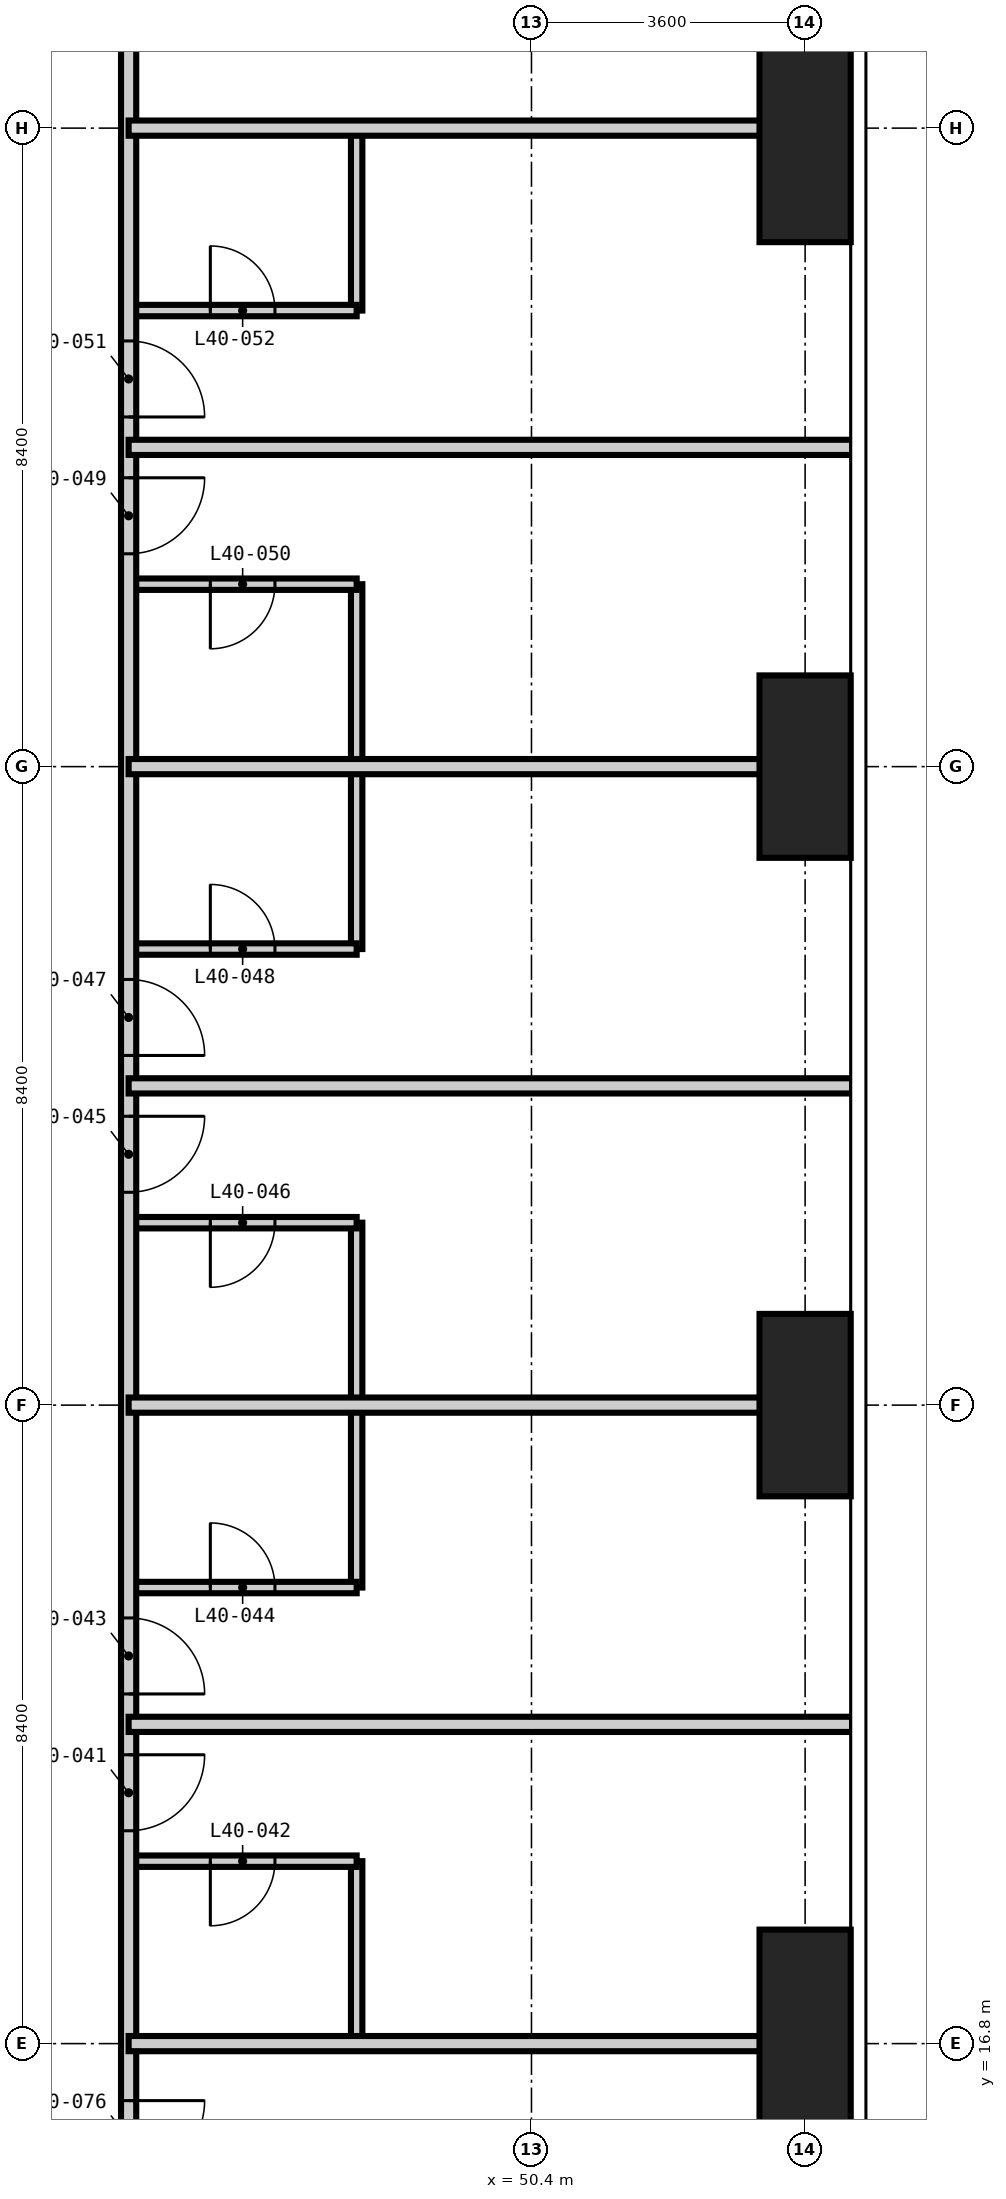
"""IFC4 building model, lengths in metres.
Left out: names, types, materials, properties, quantities, classifications, styles, units other than length and angle.
Written with IfcOpenShell. Run it as: python <this file> out.ifc"""

import sys

from ifc_helpers import new_model, si_unit, direction, frame, frame_2d, origin, origin_2d, place, context, subcontext, project, spatial, rectangle, extrude, element, fill, save


model = new_model("IFC4")
c1 = context("Model", 3, precision=1e-05, world=origin(), true_north=direction((0.0, 1.0)))
c2 = subcontext(c1, "Body", "Model", "MODEL_VIEW")
j1 = project(units=[si_unit("LENGTHUNIT", "METRE"), si_unit("PLANEANGLEUNIT", "RADIAN")], contexts=[c1])
p1 = place(None, origin())
s1 = spatial("IfcSite", under=j1, at=p1, CompositionType="ELEMENT")
p2 = place(p1, origin())
s2 = spatial("IfcBuilding", under=s1, at=p2, CompositionType="ELEMENT")
p3 = place(p2, frame((0.0, 0.0, 159.0)))
s3 = spatial("IfcBuildingStorey", under=s2, at=p3, CompositionType="ELEMENT", Elevation=159.0)
p4 = place(p3, frame((54.0, 16.8, -0.35), z_axis=(0.0, 0.0, 1.0), x_axis=(1.0, 0.0, 0.0)))
e1 = element("IfcColumn", 1, at=p4, inside=s3, PredefinedType="COLUMN", context=c2, shape_type="SweptSolid", body=[
    extrude(rectangle(XDim=1.2, YDim=3.0, at=origin_2d()), origin(), (0.0, 0.0, 1.0), 3.6),
])
for number, where, z_axis, x_axis in (
    (2, (54.0, 25.2, -0.35), (0.0, 0.0, 1.0), (1.0, 0.0, 0.0)),
    (3, (54.0, 33.6, -0.35), (0.0, 0.0, 1.0), (1.0, 0.0, 0.0)),
):
    element("IfcColumn", number, at=place(p3, frame(where, z_axis=z_axis, x_axis=x_axis)), inside=s3, PredefinedType="COLUMN", context=c2, shape_type="SweptSolid", body=[
        extrude(rectangle(XDim=1.2, YDim=2.4, at=origin_2d()), origin(), (0.0, 0.0, 1.0), 3.6),
    ])
p5 = place(p3, frame((54.0, 42.0, -0.35), z_axis=(0.0, 0.0, 1.0), x_axis=(1.0, 0.0, 0.0)))
e4 = element("IfcColumn", 4, at=p5, inside=s3, PredefinedType="COLUMN", context=c2, shape_type="SweptSolid", body=[
    extrude(rectangle(XDim=1.2, YDim=3.0, at=origin_2d()), origin(), (0.0, 0.0, 1.0), 3.6),
])
p6 = place(p3, frame((48.1, 16.8, 0.0), z_axis=(0.0, 0.0, 1.0), x_axis=(0.0, 1.0, 0.0)))
e5 = element("IfcWall", 5, at=p6, inside=s3, PredefinedType="PARTITIONING", context=c2, shape_type="SweptSolid", body=[
    extrude(rectangle(XDim=2.4, YDim=0.15, at=frame_2d((1.2, 0.0))), origin(), (0.0, 0.0, 1.0), 3.25),
])
for number, where, z_axis, x_axis in (
    (6, (48.1, 22.8, 0.0), (0.0, 0.0, 1.0), (0.0, 1.0, 0.0)),
    (7, (48.1, 31.2, 0.0), (0.0, 0.0, 1.0), (0.0, 1.0, 0.0)),
):
    element("IfcWall", number, at=place(p3, frame(where, z_axis=z_axis, x_axis=x_axis)), inside=s3, PredefinedType="PARTITIONING", context=c2, shape_type="SweptSolid", body=[
        extrude(rectangle(XDim=4.8, YDim=0.15, at=frame_2d((2.4, 0.0))), origin(), (0.0, 0.0, 1.0), 3.25),
    ])
p7 = place(p3, frame((48.1, 39.6, 0.0), z_axis=(0.0, 0.0, 1.0), x_axis=(0.0, 1.0, 0.0)))
e8 = element("IfcWall", 8, at=p7, inside=s3, PredefinedType="PARTITIONING", context=c2, shape_type="SweptSolid", body=[
    extrude(rectangle(XDim=2.4, YDim=0.15, at=frame_2d((1.2, 0.0))), origin(), (0.0, 0.0, 1.0), 3.25),
])
p8 = place(p3, frame((45.1, 19.2, 0.0), z_axis=(0.0, 0.0, 1.0), x_axis=(1.0, 0.0, 0.0)))
e9 = element("IfcWall", 9, at=p8, inside=s3, PredefinedType="PARTITIONING", context=c2, shape_type="SweptSolid", body=[
    extrude(rectangle(XDim=3.0, YDim=0.15, at=frame_2d((1.5, 0.0))), origin(), (0.0, 0.0, 1.0), 3.25),
])
p9 = place(p8, frame((1.075, 0.0, 0.0)))
e10 = element("IfcOpeningElement", 10, at=p9, cuts=e9, PredefinedType="OPENING", context=c2, shape_type="SweptSolid", body=[
    extrude(rectangle(XDim=0.85, YDim=2.1, at=frame_2d((0.425, 1.05))), frame((0.0, 0.085, 0.0), z_axis=(0.0, -1.0, 0.0), x_axis=(1.0, 0.0, 0.0)), (0.0, 0.0, 1.0), 0.17),
])
p10 = place(p3, frame((45.1, 22.8, 0.0), z_axis=(0.0, 0.0, 1.0), x_axis=(1.0, 0.0, 0.0)))
e11 = element("IfcWall", 11, at=p10, inside=s3, PredefinedType="PARTITIONING", context=c2, shape_type="SweptSolid", body=[
    extrude(rectangle(XDim=3.0, YDim=0.15, at=frame_2d((1.5, 0.0))), origin(), (0.0, 0.0, 1.0), 3.25),
])
p11 = place(p10, frame((1.075, 0.0, 0.0)))
e12 = element("IfcOpeningElement", 12, at=p11, cuts=e11, PredefinedType="OPENING", context=c2, shape_type="SweptSolid", body=[
    extrude(rectangle(XDim=0.85, YDim=2.1, at=frame_2d((0.425, 1.05))), frame((0.0, 0.085, 0.0), z_axis=(0.0, -1.0, 0.0), x_axis=(1.0, 0.0, 0.0)), (0.0, 0.0, 1.0), 0.17),
])
p12 = place(p3, frame((45.1, 27.6, 0.0), z_axis=(0.0, 0.0, 1.0), x_axis=(1.0, 0.0, 0.0)))
e13 = element("IfcWall", 13, at=p12, inside=s3, PredefinedType="PARTITIONING", context=c2, shape_type="SweptSolid", body=[
    extrude(rectangle(XDim=3.0, YDim=0.15, at=frame_2d((1.5, 0.0))), origin(), (0.0, 0.0, 1.0), 3.25),
])
p13 = place(p12, frame((1.075, 0.0, 0.0)))
e14 = element("IfcOpeningElement", 14, at=p13, cuts=e13, PredefinedType="OPENING", context=c2, shape_type="SweptSolid", body=[
    extrude(rectangle(XDim=0.85, YDim=2.1, at=frame_2d((0.425, 1.05))), frame((0.0, 0.085, 0.0), z_axis=(0.0, -1.0, 0.0), x_axis=(1.0, 0.0, 0.0)), (0.0, 0.0, 1.0), 0.17),
])
p14 = place(p3, frame((45.1, 31.2, 0.0), z_axis=(0.0, 0.0, 1.0), x_axis=(1.0, 0.0, 0.0)))
e15 = element("IfcWall", 15, at=p14, inside=s3, PredefinedType="PARTITIONING", context=c2, shape_type="SweptSolid", body=[
    extrude(rectangle(XDim=3.0, YDim=0.15, at=frame_2d((1.5, 0.0))), origin(), (0.0, 0.0, 1.0), 3.25),
])
p15 = place(p14, frame((1.075, 0.0, 0.0)))
e16 = element("IfcOpeningElement", 16, at=p15, cuts=e15, PredefinedType="OPENING", context=c2, shape_type="SweptSolid", body=[
    extrude(rectangle(XDim=0.85, YDim=2.1, at=frame_2d((0.425, 1.05))), frame((0.0, 0.085, 0.0), z_axis=(0.0, -1.0, 0.0), x_axis=(1.0, 0.0, 0.0)), (0.0, 0.0, 1.0), 0.17),
])
p16 = place(p3, frame((45.1, 36.0, 0.0), z_axis=(0.0, 0.0, 1.0), x_axis=(1.0, 0.0, 0.0)))
e17 = element("IfcWall", 17, at=p16, inside=s3, PredefinedType="PARTITIONING", context=c2, shape_type="SweptSolid", body=[
    extrude(rectangle(XDim=3.0, YDim=0.15, at=frame_2d((1.5, 0.0))), origin(), (0.0, 0.0, 1.0), 3.25),
])
p17 = place(p16, frame((1.075, 0.0, 0.0)))
e18 = element("IfcOpeningElement", 18, at=p17, cuts=e17, PredefinedType="OPENING", context=c2, shape_type="SweptSolid", body=[
    extrude(rectangle(XDim=0.85, YDim=2.1, at=frame_2d((0.425, 1.05))), frame((0.0, 0.085, 0.0), z_axis=(0.0, -1.0, 0.0), x_axis=(1.0, 0.0, 0.0)), (0.0, 0.0, 1.0), 0.17),
])
p18 = place(p3, frame((45.1, 39.6, 0.0), z_axis=(0.0, 0.0, 1.0), x_axis=(1.0, 0.0, 0.0)))
e19 = element("IfcWall", 19, at=p18, inside=s3, PredefinedType="PARTITIONING", context=c2, shape_type="SweptSolid", body=[
    extrude(rectangle(XDim=3.0, YDim=0.15, at=frame_2d((1.5, 0.0))), origin(), (0.0, 0.0, 1.0), 3.25),
])
p19 = place(p18, frame((1.075, 0.0, 0.0)))
e20 = element("IfcOpeningElement", 20, at=p19, cuts=e19, PredefinedType="OPENING", context=c2, shape_type="SweptSolid", body=[
    extrude(rectangle(XDim=0.85, YDim=2.1, at=frame_2d((0.425, 1.05))), frame((0.0, 0.085, 0.0), z_axis=(0.0, -1.0, 0.0), x_axis=(1.0, 0.0, 0.0)), (0.0, 0.0, 1.0), 0.17),
])
p20 = place(p3, frame((45.1, 45.7, 0.0), z_axis=(0.0, 0.0, 1.0), x_axis=(0.0, -1.0, 0.0)))
e21 = element("IfcWall", 21, at=p20, inside=s3, PredefinedType="PARTITIONING", context=c2, shape_type="SweptSolid", body=[
    extrude(rectangle(XDim=31.4, YDim=0.2, at=frame_2d((15.7, 0.0))), origin(), (0.0, 0.0, 1.0), 3.25),
])
p21 = place(p20, frame((25.1, 0.0, 0.0)))
e22 = element("IfcOpeningElement", 22, at=p21, cuts=e21, PredefinedType="OPENING", context=c2, shape_type="SweptSolid", body=[
    extrude(rectangle(XDim=1.0, YDim=2.2, at=frame_2d((0.5, 1.1))), frame((0.0, 0.11, 0.0), z_axis=(0.0, -1.0, 0.0), x_axis=(1.0, 0.0, 0.0)), (0.0, 0.0, 1.0), 0.22),
])
p22 = place(p20, frame((23.3, 0.0, 0.0)))
e23 = element("IfcOpeningElement", 23, at=p22, cuts=e21, PredefinedType="OPENING", context=c2, shape_type="SweptSolid", body=[
    extrude(rectangle(XDim=1.0, YDim=2.2, at=frame_2d((0.5, 1.1))), frame((0.0, 0.11, 0.0), z_axis=(0.0, -1.0, 0.0), x_axis=(1.0, 0.0, 0.0)), (0.0, 0.0, 1.0), 0.22),
])
p23 = place(p20, frame((16.7, 0.0, 0.0)))
e24 = element("IfcOpeningElement", 24, at=p23, cuts=e21, PredefinedType="OPENING", context=c2, shape_type="SweptSolid", body=[
    extrude(rectangle(XDim=1.0, YDim=2.2, at=frame_2d((0.5, 1.1))), frame((0.0, 0.11, 0.0), z_axis=(0.0, -1.0, 0.0), x_axis=(1.0, 0.0, 0.0)), (0.0, 0.0, 1.0), 0.22),
])
p24 = place(p20, frame((14.9, 0.0, 0.0)))
e25 = element("IfcOpeningElement", 25, at=p24, cuts=e21, PredefinedType="OPENING", context=c2, shape_type="SweptSolid", body=[
    extrude(rectangle(XDim=1.0, YDim=2.2, at=frame_2d((0.5, 1.1))), frame((0.0, 0.11, 0.0), z_axis=(0.0, -1.0, 0.0), x_axis=(1.0, 0.0, 0.0)), (0.0, 0.0, 1.0), 0.22),
])
p25 = place(p20, frame((8.3, 0.0, 0.0)))
e26 = element("IfcOpeningElement", 26, at=p25, cuts=e21, PredefinedType="OPENING", context=c2, shape_type="SweptSolid", body=[
    extrude(rectangle(XDim=1.0, YDim=2.2, at=frame_2d((0.5, 1.1))), frame((0.0, 0.11, 0.0), z_axis=(0.0, -1.0, 0.0), x_axis=(1.0, 0.0, 0.0)), (0.0, 0.0, 1.0), 0.22),
])
p26 = place(p20, frame((6.5, 0.0, 0.0)))
e27 = element("IfcOpeningElement", 27, at=p26, cuts=e21, PredefinedType="OPENING", context=c2, shape_type="SweptSolid", body=[
    extrude(rectangle(XDim=1.0, YDim=2.2, at=frame_2d((0.5, 1.1))), frame((0.0, 0.11, 0.0), z_axis=(0.0, -1.0, 0.0), x_axis=(1.0, 0.0, 0.0)), (0.0, 0.0, 1.0), 0.22),
])
p27 = place(p20, frame((29.65, 0.0, 0.0)))
e28 = element("IfcOpeningElement", 28, at=p27, cuts=e21, PredefinedType="OPENING", context=c2, shape_type="SweptSolid", body=[
    extrude(rectangle(XDim=1.0, YDim=2.2, at=frame_2d((0.5, 1.1))), frame((0.0, 0.11, 0.0), z_axis=(0.0, -1.0, 0.0), x_axis=(1.0, 0.0, 0.0)), (0.0, 0.0, 1.0), 0.22),
])
p28 = place(p20, frame((1.35, 0.0, 0.0)))
e29 = element("IfcOpeningElement", 29, at=p28, cuts=e21, PredefinedType="OPENING", context=c2, shape_type="SweptSolid", body=[
    extrude(rectangle(XDim=1.0, YDim=2.2, at=frame_2d((0.5, 1.1))), frame((0.0, 0.11, 0.0), z_axis=(0.0, -1.0, 0.0), x_axis=(1.0, 0.0, 0.0)), (0.0, 0.0, 1.0), 0.22),
])
for number, where, z_axis, x_axis in (
    (30, (45.1, 16.8, 0.0), (0.0, 0.0, 1.0), (1.0, 0.0, 0.0)),
    (31, (45.1, 21.0, 0.0), (0.0, 0.0, 1.0), (1.0, 0.0, 0.0)),
    (32, (45.1, 25.2, 0.0), (0.0, 0.0, 1.0), (1.0, 0.0, 0.0)),
    (33, (45.1, 29.4, 0.0), (0.0, 0.0, 1.0), (1.0, 0.0, 0.0)),
    (34, (45.1, 33.6, 0.0), (0.0, 0.0, 1.0), (1.0, 0.0, 0.0)),
    (35, (45.1, 37.8, 0.0), (0.0, 0.0, 1.0), (1.0, 0.0, 0.0)),
    (36, (45.1, 42.0, 0.0), (0.0, 0.0, 1.0), (1.0, 0.0, 0.0)),
):
    element("IfcWall", number, at=place(p3, frame(where, z_axis=z_axis, x_axis=x_axis)), inside=s3, PredefinedType="PARTITIONING", context=c2, shape_type="SweptSolid", body=[
        extrude(rectangle(XDim=9.518, YDim=0.2, at=frame_2d((4.759, 0.0))), origin(), (0.0, 0.0, 1.0), 3.25),
    ])
p29 = place(p21, origin())
e37 = element("IfcDoor", 37, at=p29, inside=s3, OperationType="SINGLE_SWING_LEFT", PredefinedType="DOOR", context=c2, shape_type="SweptSolid", body=[
    extrude(rectangle(XDim=1.0, YDim=2.2, at=frame_2d((0.5, 1.1))), frame((0.0, 0.025, 0.0), z_axis=(0.0, -1.0, 0.0), x_axis=(1.0, 0.0, 0.0)), (0.0, 0.0, 1.0), 0.05),
])
fill(e22, e37)
p30 = place(p9, frame((0.85, 0.0, 0.0), z_axis=(0.0, 0.0, 1.0), x_axis=(-1.0, 0.0, 0.0)))
e38 = element("IfcDoor", 38, at=p30, inside=s3, OperationType="SINGLE_SWING_RIGHT", PredefinedType="DOOR", context=c2, shape_type="SweptSolid", body=[
    extrude(rectangle(XDim=0.85, YDim=2.1, at=frame_2d((0.425, 1.05))), frame((0.0, 0.025, 0.0), z_axis=(0.0, -1.0, 0.0), x_axis=(1.0, 0.0, 0.0)), (0.0, 0.0, 1.0), 0.05),
])
fill(e10, e38)
p31 = place(p22, origin())
e39 = element("IfcDoor", 39, at=p31, inside=s3, OperationType="SINGLE_SWING_RIGHT", PredefinedType="DOOR", context=c2, shape_type="SweptSolid", body=[
    extrude(rectangle(XDim=1.0, YDim=2.2, at=frame_2d((0.5, 1.1))), frame((0.0, 0.025, 0.0), z_axis=(0.0, -1.0, 0.0), x_axis=(1.0, 0.0, 0.0)), (0.0, 0.0, 1.0), 0.05),
])
fill(e23, e39)
p32 = place(p11, origin())
e40 = element("IfcDoor", 40, at=p32, inside=s3, OperationType="SINGLE_SWING_LEFT", PredefinedType="DOOR", context=c2, shape_type="SweptSolid", body=[
    extrude(rectangle(XDim=0.85, YDim=2.1, at=frame_2d((0.425, 1.05))), frame((0.0, 0.025, 0.0), z_axis=(0.0, -1.0, 0.0), x_axis=(1.0, 0.0, 0.0)), (0.0, 0.0, 1.0), 0.05),
])
fill(e12, e40)
p33 = place(p23, origin())
e41 = element("IfcDoor", 41, at=p33, inside=s3, OperationType="SINGLE_SWING_LEFT", PredefinedType="DOOR", context=c2, shape_type="SweptSolid", body=[
    extrude(rectangle(XDim=1.0, YDim=2.2, at=frame_2d((0.5, 1.1))), frame((0.0, 0.025, 0.0), z_axis=(0.0, -1.0, 0.0), x_axis=(1.0, 0.0, 0.0)), (0.0, 0.0, 1.0), 0.05),
])
fill(e24, e41)
p34 = place(p13, frame((0.85, 0.0, 0.0), z_axis=(0.0, 0.0, 1.0), x_axis=(-1.0, 0.0, 0.0)))
e42 = element("IfcDoor", 42, at=p34, inside=s3, OperationType="SINGLE_SWING_RIGHT", PredefinedType="DOOR", context=c2, shape_type="SweptSolid", body=[
    extrude(rectangle(XDim=0.85, YDim=2.1, at=frame_2d((0.425, 1.05))), frame((0.0, 0.025, 0.0), z_axis=(0.0, -1.0, 0.0), x_axis=(1.0, 0.0, 0.0)), (0.0, 0.0, 1.0), 0.05),
])
fill(e14, e42)
p35 = place(p24, origin())
e43 = element("IfcDoor", 43, at=p35, inside=s3, OperationType="SINGLE_SWING_RIGHT", PredefinedType="DOOR", context=c2, shape_type="SweptSolid", body=[
    extrude(rectangle(XDim=1.0, YDim=2.2, at=frame_2d((0.5, 1.1))), frame((0.0, 0.025, 0.0), z_axis=(0.0, -1.0, 0.0), x_axis=(1.0, 0.0, 0.0)), (0.0, 0.0, 1.0), 0.05),
])
fill(e25, e43)
p36 = place(p15, origin())
e44 = element("IfcDoor", 44, at=p36, inside=s3, OperationType="SINGLE_SWING_LEFT", PredefinedType="DOOR", context=c2, shape_type="SweptSolid", body=[
    extrude(rectangle(XDim=0.85, YDim=2.1, at=frame_2d((0.425, 1.05))), frame((0.0, 0.025, 0.0), z_axis=(0.0, -1.0, 0.0), x_axis=(1.0, 0.0, 0.0)), (0.0, 0.0, 1.0), 0.05),
])
fill(e16, e44)
p37 = place(p25, origin())
e45 = element("IfcDoor", 45, at=p37, inside=s3, OperationType="SINGLE_SWING_LEFT", PredefinedType="DOOR", context=c2, shape_type="SweptSolid", body=[
    extrude(rectangle(XDim=1.0, YDim=2.2, at=frame_2d((0.5, 1.1))), frame((0.0, 0.025, 0.0), z_axis=(0.0, -1.0, 0.0), x_axis=(1.0, 0.0, 0.0)), (0.0, 0.0, 1.0), 0.05),
])
fill(e26, e45)
p38 = place(p17, frame((0.85, 0.0, 0.0), z_axis=(0.0, 0.0, 1.0), x_axis=(-1.0, 0.0, 0.0)))
e46 = element("IfcDoor", 46, at=p38, inside=s3, OperationType="SINGLE_SWING_RIGHT", PredefinedType="DOOR", context=c2, shape_type="SweptSolid", body=[
    extrude(rectangle(XDim=0.85, YDim=2.1, at=frame_2d((0.425, 1.05))), frame((0.0, 0.025, 0.0), z_axis=(0.0, -1.0, 0.0), x_axis=(1.0, 0.0, 0.0)), (0.0, 0.0, 1.0), 0.05),
])
fill(e18, e46)
p39 = place(p26, origin())
e47 = element("IfcDoor", 47, at=p39, inside=s3, OperationType="SINGLE_SWING_RIGHT", PredefinedType="DOOR", context=c2, shape_type="SweptSolid", body=[
    extrude(rectangle(XDim=1.0, YDim=2.2, at=frame_2d((0.5, 1.1))), frame((0.0, 0.025, 0.0), z_axis=(0.0, -1.0, 0.0), x_axis=(1.0, 0.0, 0.0)), (0.0, 0.0, 1.0), 0.05),
])
fill(e27, e47)
p40 = place(p19, origin())
e48 = element("IfcDoor", 48, at=p40, inside=s3, OperationType="SINGLE_SWING_LEFT", PredefinedType="DOOR", context=c2, shape_type="SweptSolid", body=[
    extrude(rectangle(XDim=0.85, YDim=2.1, at=frame_2d((0.425, 1.05))), frame((0.0, 0.025, 0.0), z_axis=(0.0, -1.0, 0.0), x_axis=(1.0, 0.0, 0.0)), (0.0, 0.0, 1.0), 0.05),
])
fill(e20, e48)
p41 = place(p27, origin())
e49 = element("IfcDoor", 49, at=p41, inside=s3, OperationType="SINGLE_SWING_LEFT", PredefinedType="DOOR", context=c2, shape_type="SweptSolid", body=[
    extrude(rectangle(XDim=1.0, YDim=2.2, at=frame_2d((0.5, 1.1))), frame((0.0, 0.025, 0.0), z_axis=(0.0, -1.0, 0.0), x_axis=(1.0, 0.0, 0.0)), (0.0, 0.0, 1.0), 0.05),
])
fill(e28, e49)
save(model, sys.argv[1])
